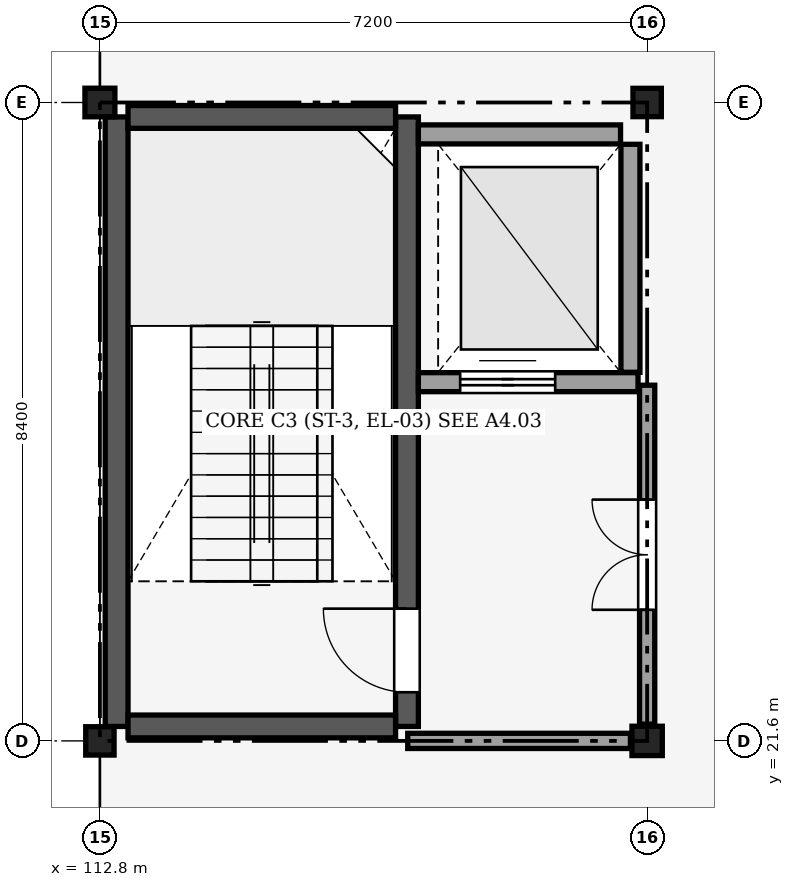
"""IFC4 building model, lengths in metres.
Left out: names, types, materials, properties, quantities, classifications, styles, units other than length and angle.
Written with IfcOpenShell. Run it as: python <this file> out.ifc"""

import sys

from ifc_helpers import new_model, si_unit, direction, frame, frame_2d, origin, origin_2d, place, context, subcontext, project, spatial, rectangle, i_section, extrude, element, fill, save


model = new_model("IFC4")
c1 = context("Model", 3, precision=1e-05, world=origin(), true_north=direction((0.0, 1.0)))
c2 = subcontext(c1, "Body", "Model", "MODEL_VIEW")
j1 = project(units=[si_unit("LENGTHUNIT", "METRE"), si_unit("PLANEANGLEUNIT", "RADIAN")], contexts=[c1])
p1 = place(None, origin())
s1 = spatial("IfcSite", under=j1, at=p1, CompositionType="ELEMENT")
p2 = place(p1, origin())
s2 = spatial("IfcBuilding", under=s1, at=p2, CompositionType="ELEMENT")
p3 = place(p2, frame((0.0, 0.0, 10.2)))
s3 = spatial("IfcBuildingStorey", under=s2, at=p3, CompositionType="ELEMENT", Elevation=10.2)
p4 = place(p3, frame((112.8, 21.6, 0.0), z_axis=(0.0, 0.0, 1.0), x_axis=(1.0, 0.0, 0.0)))
e1 = element("IfcColumn", 1, at=p4, inside=s3, PredefinedType="COLUMN", context=c2, shape_type="SweptSolid", body=[
    extrude(i_section(OverallWidth=0.373, OverallDepth=0.373, WebThickness=0.016, FlangeThickness=0.026, FilletRadius=0.025, at=origin_2d()), origin(), (0.0, 0.0, 1.0), 4.8),
])
p5 = place(p3, frame((112.8, 30.0, 0.0), z_axis=(0.0, 0.0, 1.0), x_axis=(1.0, 0.0, 0.0)))
e2 = element("IfcColumn", 2, at=p5, inside=s3, PredefinedType="COLUMN", context=c2, shape_type="SweptSolid", body=[
    extrude(i_section(OverallWidth=0.394, OverallDepth=0.376, WebThickness=0.017, FlangeThickness=0.028, FilletRadius=0.025, at=origin_2d()), origin(), (0.0, 0.0, 1.0), 4.8),
])
p6 = place(p3, frame((120.0, 21.6, 0.0), z_axis=(0.0, 0.0, 1.0), x_axis=(1.0, 0.0, 0.0)))
e3 = element("IfcColumn", 3, at=p6, inside=s3, PredefinedType="COLUMN", context=c2, shape_type="SweptSolid", body=[
    extrude(i_section(OverallWidth=0.399, OverallDepth=0.386, WebThickness=0.021, FlangeThickness=0.033, FilletRadius=0.025, at=origin_2d()), origin(), (0.0, 0.0, 1.0), 4.8),
])
p7 = place(p3, frame((120.0, 30.0, 0.0), z_axis=(0.0, 0.0, 1.0), x_axis=(1.0, 0.0, 0.0)))
e4 = element("IfcColumn", 4, at=p7, inside=s3, PredefinedType="COLUMN", context=c2, shape_type="SweptSolid", body=[
    extrude(i_section(OverallWidth=0.373, OverallDepth=0.373, WebThickness=0.016, FlangeThickness=0.026, FilletRadius=0.025, at=origin_2d()), origin(), (0.0, 0.0, 1.0), 4.8),
])
p8 = place(p3, frame((113.02, 21.79, 0.0), z_axis=(0.0, 0.0, 1.0), x_axis=(0.0, 1.0, 0.0)))
e5 = element("IfcWall", 5, at=p8, inside=s3, PredefinedType="SHEAR", context=c2, shape_type="SweptSolid", body=[
    extrude(rectangle(XDim=8.02, YDim=0.3, at=frame_2d((4.01, 0.0))), origin(), (0.0, 0.0, 1.0), 4.56),
])
p9 = place(p3, frame((116.84, 21.79, 0.0), z_axis=(0.0, 0.0, 1.0), x_axis=(0.0, 1.0, 0.0)))
e6 = element("IfcWall", 6, at=p9, inside=s3, PredefinedType="SHEAR", context=c2, shape_type="SweptSolid", body=[
    extrude(rectangle(XDim=8.02, YDim=0.3, at=frame_2d((4.01, 0.0))), origin(), (0.0, 0.0, 1.0), 4.56),
])
p10 = place(p9, frame((0.45, 0.0, 0.0)))
e7 = element("IfcOpeningElement", 7, at=p10, cuts=e6, PredefinedType="OPENING", context=c2, shape_type="SweptSolid", body=[
    extrude(rectangle(XDim=1.1, YDim=2.15, at=frame_2d((0.55, 1.075))), frame((0.0, 0.16, 0.0), z_axis=(0.0, -1.0, 0.0), x_axis=(1.0, 0.0, 0.0)), (0.0, 0.0, 1.0), 0.321),
])
for number, where, z_axis, x_axis in (
    (8, (113.17, 21.79, 0.0), (0.0, 0.0, 1.0), (1.0, 0.0, 0.0)),
    (9, (113.17, 29.81, 0.0), (0.0, 0.0, 1.0), (1.0, 0.0, 0.0)),
):
    element("IfcWall", number, at=place(p3, frame(where, z_axis=z_axis, x_axis=x_axis)), inside=s3, PredefinedType="SHEAR", context=c2, shape_type="SweptSolid", body=[
        extrude(rectangle(XDim=3.52, YDim=0.3, at=frame_2d((1.76, 0.0))), origin(), (0.0, 0.0, 1.0), 4.56),
    ])
p11 = place(p3, frame((116.99, 29.58, 0.0), z_axis=(0.0, 0.0, 1.0), x_axis=(1.0, 0.0, 0.0)))
e10 = element("IfcWall", 10, at=p11, inside=s3, PredefinedType="PARTITIONING", context=c2, shape_type="SweptSolid", body=[
    extrude(rectangle(XDim=2.66, YDim=0.25, at=frame_2d((1.33, 0.0))), origin(), (0.0, 0.0, 1.0), 4.56),
])
p12 = place(p3, frame((119.78, 26.45, 0.0), z_axis=(0.0, 0.0, 1.0), x_axis=(0.0, 1.0, 0.0)))
e11 = element("IfcWall", 11, at=p12, inside=s3, PredefinedType="PARTITIONING", context=c2, shape_type="SweptSolid", body=[
    extrude(rectangle(XDim=3.0, YDim=0.25, at=frame_2d((1.5, 0.0))), origin(), (0.0, 0.0, 1.0), 3.613),
])
p13 = place(p3, frame((116.99, 26.32, 0.0), z_axis=(0.0, 0.0, 1.0), x_axis=(1.0, 0.0, 0.0)))
e12 = element("IfcWall", 12, at=p13, inside=s3, PredefinedType="PARTITIONING", context=c2, shape_type="SweptSolid", body=[
    extrude(rectangle(XDim=2.89, YDim=0.25, at=frame_2d((1.445, 0.0))), origin(), (0.0, 0.0, 1.0), 4.56),
])
p14 = place(p13, frame((0.55, 0.0, 0.0)))
e13 = element("IfcOpeningElement", 13, at=p14, cuts=e12, PredefinedType="OPENING", context=c2, shape_type="SweptSolid", body=[
    extrude(rectangle(XDim=1.25, YDim=2.15, at=frame_2d((0.625, 1.075))), frame((0.0, 0.135, 0.0), z_axis=(0.0, -1.0, 0.0), x_axis=(1.0, 0.0, 0.0)), (0.0, 0.0, 1.0), 0.271),
])
p15 = place(p3, frame((116.85, 21.6, 0.0), z_axis=(0.0, 0.0, 1.0), x_axis=(1.0, 0.0, 0.0)))
e14 = element("IfcWall", 14, at=p15, inside=s3, PredefinedType="PARTITIONING", context=c2, shape_type="SweptSolid", body=[
    extrude(rectangle(XDim=2.93, YDim=0.2, at=frame_2d((1.465, 0.0))), origin(), (0.0, 0.0, 1.0), 3.991),
])
p16 = place(p3, frame((120.0, 21.82, 0.0), z_axis=(0.0, 0.0, 1.0), x_axis=(0.0, 1.0, 0.0)))
e15 = element("IfcWall", 15, at=p16, inside=s3, PredefinedType="PARTITIONING", context=c2, shape_type="SweptSolid", body=[
    extrude(rectangle(XDim=4.46, YDim=0.2, at=frame_2d((2.23, 0.0))), origin(), (0.0, 0.0, 1.0), 3.613),
])
p17 = place(p16, frame((1.505, 0.0, 0.0)))
e16 = element("IfcOpeningElement", 16, at=p17, cuts=e15, PredefinedType="OPENING", context=c2, shape_type="SweptSolid", body=[
    extrude(rectangle(XDim=1.45, YDim=2.2, at=frame_2d((0.725, 1.1))), frame((0.0, 0.11, 0.0), z_axis=(0.0, -1.0, 0.0), x_axis=(1.0, 0.0, 0.0)), (0.0, 0.0, 1.0), 0.22),
])
p18 = place(p10, origin())
e17 = element("IfcDoor", 17, at=p18, inside=s3, OperationType="SINGLE_SWING_RIGHT", PredefinedType="DOOR", context=c2, shape_type="SweptSolid", body=[
    extrude(rectangle(XDim=1.1, YDim=2.15, at=frame_2d((0.55, 1.075))), frame((0.0, 0.025, 0.0), z_axis=(0.0, -1.0, 0.0), x_axis=(1.0, 0.0, 0.0)), (0.0, 0.0, 1.0), 0.05),
])
fill(e7, e17)
p19 = place(p14, origin())
e18 = element("IfcDoor", 18, at=p19, inside=s3, OperationType="DOUBLE_DOOR_SLIDING", PredefinedType="DOOR", context=c2, shape_type="SweptSolid", body=[
    extrude(rectangle(XDim=1.25, YDim=2.15, at=frame_2d((0.625, 1.075))), frame((0.0, 0.025, 0.0), z_axis=(0.0, -1.0, 0.0), x_axis=(1.0, 0.0, 0.0)), (0.0, 0.0, 1.0), 0.05),
])
fill(e13, e18)
p20 = place(p17, origin())
e19 = element("IfcDoor", 19, at=p20, inside=s3, OperationType="DOUBLE_DOOR_SINGLE_SWING", PredefinedType="DOOR", context=c2, shape_type="SweptSolid", body=[
    extrude(rectangle(XDim=1.45, YDim=2.2, at=frame_2d((0.725, 1.1))), frame((0.0, 0.025, 0.0), z_axis=(0.0, -1.0, 0.0), x_axis=(1.0, 0.0, 0.0)), (0.0, 0.0, 1.0), 0.05),
])
fill(e16, e19)
save(model, sys.argv[1])
